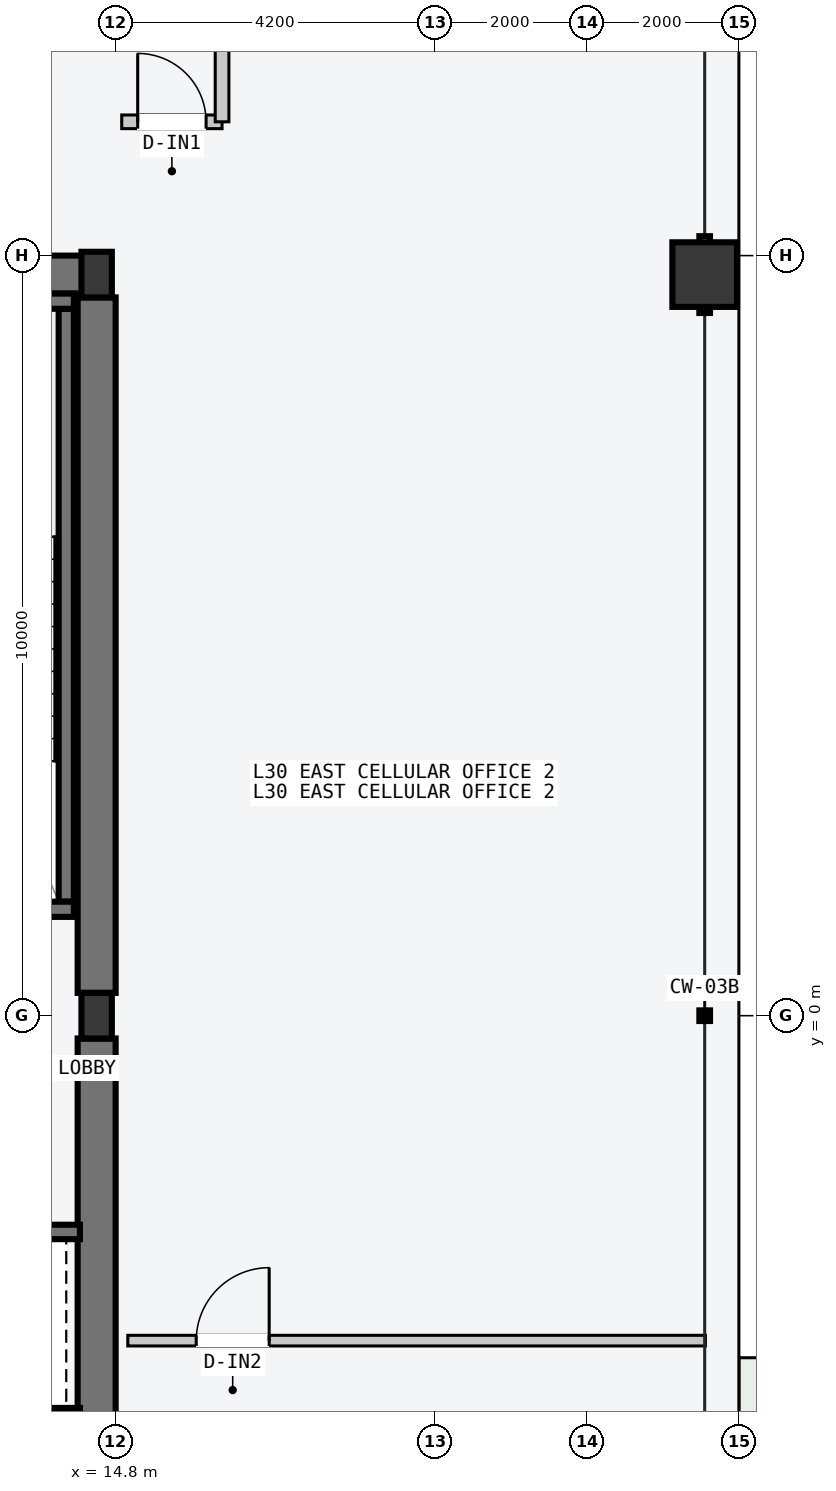
"""IFC4 building model, lengths in metres.
Left out: names, types, materials, properties, quantities, classifications, styles, units other than length and angle.
Written with IfcOpenShell. Run it as: python <this file> out.ifc"""

import sys

from ifc_helpers import new_model, si_unit, direction, frame, frame_2d, origin, origin_2d, place, context, subcontext, project, spatial, rectangle, hollow_rectangle, i_section, extrude, element, fill, save


model = new_model("IFC4")
c1 = context("Model", 3, precision=1e-05, world=origin(), true_north=direction((0.0, 1.0)))
c2 = subcontext(c1, "Body", "Model", "MODEL_VIEW")
j1 = project(units=[si_unit("LENGTHUNIT", "METRE"), si_unit("PLANEANGLEUNIT", "RADIAN")], contexts=[c1])
p1 = place(None, origin())
s1 = spatial("IfcSite", under=j1, at=p1, CompositionType="ELEMENT")
p2 = place(p1, origin())
s2 = spatial("IfcBuilding", under=s1, at=p2, CompositionType="ELEMENT")
p3 = place(p2, frame((0.0, 0.0, 117.0)))
s3 = spatial("IfcBuildingStorey", under=s2, at=p3, CompositionType="ELEMENT", Elevation=117.0)
p4 = place(p3, frame((8.07, 9.75, -0.2), z_axis=(0.0, 0.0, 1.0), x_axis=(1.0, 0.0, 0.0)))
e1 = element("IfcWall", 1, at=p4, inside=s3, PredefinedType="SHEAR", context=c2, shape_type="SweptSolid", body=[
    extrude(rectangle(XDim=6.46, YDim=0.5, at=frame_2d((3.23, 0.0))), origin(), (0.0, 0.0, 1.0), 3.6),
])
for number, where, z_axis, x_axis in (
    (2, (14.55, -9.45, -0.2), (0.0, 0.0, 1.0), (0.0, 1.0, 0.0)),
    (3, (14.55, 0.3, -0.2), (0.0, 0.0, 1.0), (0.0, 1.0, 0.0)),
):
    element("IfcWall", number, at=place(p3, frame(where, z_axis=z_axis, x_axis=x_axis)), inside=s3, PredefinedType="SHEAR", context=c2, shape_type="SweptSolid", body=[
        extrude(rectangle(XDim=9.15, YDim=0.5, at=frame_2d((4.575, 0.0))), origin(), (0.0, 0.0, 1.0), 3.6),
    ])
p5 = place(p3, frame((14.15, 1.5, -0.2), z_axis=(0.0, 0.0, 1.0), x_axis=(0.0, 1.0, 0.0)))
e4 = element("IfcWall", 4, at=p5, inside=s3, PredefinedType="SOLIDWALL", context=c2, shape_type="SweptSolid", body=[
    extrude(rectangle(XDim=7.8, YDim=0.2, at=frame_2d((3.9, 0.0))), origin(), (0.0, 0.0, 1.0), 3.6),
])
p6 = place(p3, frame((10.15, 1.4, -0.2), z_axis=(0.0, 0.0, 1.0), x_axis=(1.0, 0.0, 0.0)))
e5 = element("IfcWall", 5, at=p6, inside=s3, PredefinedType="SOLIDWALL", context=c2, shape_type="SweptSolid", body=[
    extrude(rectangle(XDim=4.1, YDim=0.2, at=frame_2d((2.05, 0.0))), origin(), (0.0, 0.0, 1.0), 3.6),
])
p7 = place(p6, frame((1.5, 0.0, 0.2)))
e6 = element("IfcOpeningElement", 6, at=p7, cuts=e5, PredefinedType="OPENING", context=c2, shape_type="SweptSolid", body=[
    extrude(rectangle(XDim=1.12, YDim=2.18, at=frame_2d((0.56, 1.09))), frame((0.0, 0.11, 0.0), z_axis=(0.0, -1.0, 0.0), x_axis=(1.0, 0.0, 0.0)), (0.0, 0.0, 1.0), 0.22),
])
p8 = place(p3, frame((10.15, 9.4, -0.2), z_axis=(0.0, 0.0, 1.0), x_axis=(1.0, 0.0, 0.0)))
e7 = element("IfcWall", 7, at=p8, inside=s3, PredefinedType="SOLIDWALL", context=c2, shape_type="SweptSolid", body=[
    extrude(rectangle(XDim=4.1, YDim=0.2, at=frame_2d((2.05, 0.0))), origin(), (0.0, 0.0, 1.0), 3.6),
])
for number, where, z_axis, x_axis in (
    (8, (14.55, 0.0, 0.0), (0.0, 0.0, 1.0), (1.0, 0.0, 0.0)),
    (9, (14.55, 9.75, 0.0), (0.0, 0.0, 1.0), (1.0, 0.0, 0.0)),
):
    element("IfcColumn", number, at=place(p3, frame(where, z_axis=z_axis, x_axis=x_axis)), inside=s3, PredefinedType="COLUMN", context=c2, shape_type="SweptSolid", body=[
        extrude(i_section(OverallWidth=0.4, OverallDepth=0.6, WebThickness=0.022, FlangeThickness=0.036, at=origin_2d()), origin(), (0.0, 0.0, 1.0), 3.6),
    ])
p9 = place(p3, frame((22.55, 9.75, 0.0), z_axis=(0.0, 0.0, 1.0), x_axis=(0.0, 1.0, 0.0)))
e10 = element("IfcColumn", 10, at=p9, inside=s3, PredefinedType="COLUMN", context=c2, shape_type="SweptSolid", body=[
    extrude(hollow_rectangle(XDim=0.85, YDim=0.85, WallThickness=0.04, at=origin_2d()), origin(), (0.0, 0.0, 1.0), 3.6),
])
p10 = place(p3, frame((11.65, -2.845, -0.2), z_axis=(0.0, 0.0, 1.0), x_axis=(1.0, 0.0, 0.0)))
e11 = element("IfcWall", 11, at=p10, inside=s3, PredefinedType="SOLIDWALL", context=c2, shape_type="SweptSolid", body=[
    extrude(rectangle(XDim=2.68, YDim=0.19, at=frame_2d((1.34, 0.0))), origin(), (0.0, 0.0, 1.0), 3.6),
])
p11 = place(p10, frame((0.65, 0.0, 0.2)))
e12 = element("IfcOpeningElement", 12, at=p11, cuts=e11, PredefinedType="OPENING", context=c2, shape_type="SweptSolid", body=[
    extrude(rectangle(XDim=1.2, YDim=2.2, at=frame_2d((0.6, 1.1))), frame((0.0, 0.105, 0.0), z_axis=(0.0, -1.0, 0.0), x_axis=(1.0, 0.0, 0.0)), (0.0, 0.0, 1.0), 0.21),
])
p12 = place(p3, frame((11.65, -5.255, -0.2), z_axis=(0.0, 0.0, 1.0), x_axis=(1.0, 0.0, 0.0)))
e13 = element("IfcWall", 13, at=p12, inside=s3, PredefinedType="SOLIDWALL", context=c2, shape_type="SweptSolid", body=[
    extrude(rectangle(XDim=2.68, YDim=0.19, at=frame_2d((1.34, 0.0))), origin(), (0.0, 0.0, 1.0), 3.6),
])
p13 = place(p3, frame((14.88, 11.76, 0.0), z_axis=(0.0, 0.0, 1.0), x_axis=(1.0, 0.0, 0.0)))
e14 = element("IfcWall", 14, at=p13, inside=s3, PredefinedType="PARTITIONING", context=c2, shape_type="SweptSolid", body=[
    extrude(rectangle(XDim=1.32, YDim=0.18, at=frame_2d((0.66, 0.0))), origin(), (0.0, 0.0, 1.0), 3.4),
])
p14 = place(p13, frame((0.21, 0.0, 0.0)))
e15 = element("IfcOpeningElement", 15, at=p14, cuts=e14, PredefinedType="OPENING", context=c2, shape_type="SweptSolid", body=[
    extrude(rectangle(XDim=0.9, YDim=2.15, at=frame_2d((0.45, 1.075))), frame((0.0, 0.1, 0.0), z_axis=(0.0, -1.0, 0.0), x_axis=(1.0, 0.0, 0.0)), (0.0, 0.0, 1.0), 0.2),
])
p15 = place(p3, frame((16.2, 11.76, 0.0), z_axis=(0.0, 0.0, 1.0), x_axis=(0.0, 1.0, 0.0)))
e16 = element("IfcWall", 16, at=p15, inside=s3, PredefinedType="PARTITIONING", context=c2, shape_type="SweptSolid", body=[
    extrude(rectangle(XDim=1.95, YDim=0.18, at=frame_2d((0.975, 0.0))), origin(), (0.0, 0.0, 1.0), 3.4),
])
p16 = place(p3, frame((14.96, -4.275, 0.0), z_axis=(0.0, 0.0, 1.0), x_axis=(1.0, 0.0, 0.0)))
e17 = element("IfcWall", 17, at=p16, inside=s3, PredefinedType="PARTITIONING", context=c2, shape_type="SweptSolid", body=[
    extrude(rectangle(XDim=7.6, YDim=0.14, at=frame_2d((3.8, 0.0))), origin(), (0.0, 0.0, 1.0), 3.4),
])
p17 = place(p16, frame((0.9, 0.0, 0.0)))
e18 = element("IfcOpeningElement", 18, at=p17, cuts=e17, PredefinedType="OPENING", context=c2, shape_type="SweptSolid", body=[
    extrude(rectangle(XDim=0.96, YDim=2.18, at=frame_2d((0.48, 1.09))), frame((0.0, 0.08, 0.0), z_axis=(0.0, -1.0, 0.0), x_axis=(1.0, 0.0, 0.0)), (0.0, 0.0, 1.0), 0.16),
])
p18 = place(p14, origin())
e19 = element("IfcDoor", 19, at=p18, inside=s3, OperationType="SINGLE_SWING_LEFT", PredefinedType="DOOR", context=c2, shape_type="SweptSolid", body=[
    extrude(rectangle(XDim=0.9, YDim=2.15, at=frame_2d((0.45, 1.075))), frame((0.0, 0.025, 0.0), z_axis=(0.0, -1.0, 0.0), x_axis=(1.0, 0.0, 0.0)), (0.0, 0.0, 1.0), 0.05),
])
fill(e15, e19)
p19 = place(p17, origin())
e20 = element("IfcDoor", 20, at=p19, inside=s3, OperationType="SINGLE_SWING_RIGHT", PredefinedType="DOOR", context=c2, shape_type="SweptSolid", body=[
    extrude(rectangle(XDim=0.96, YDim=2.18, at=frame_2d((0.48, 1.09))), frame((0.0, 0.025, 0.0), z_axis=(0.0, -1.0, 0.0), x_axis=(1.0, 0.0, 0.0)), (0.0, 0.0, 1.0), 0.05),
])
fill(e18, e20)
save(model, sys.argv[1])
